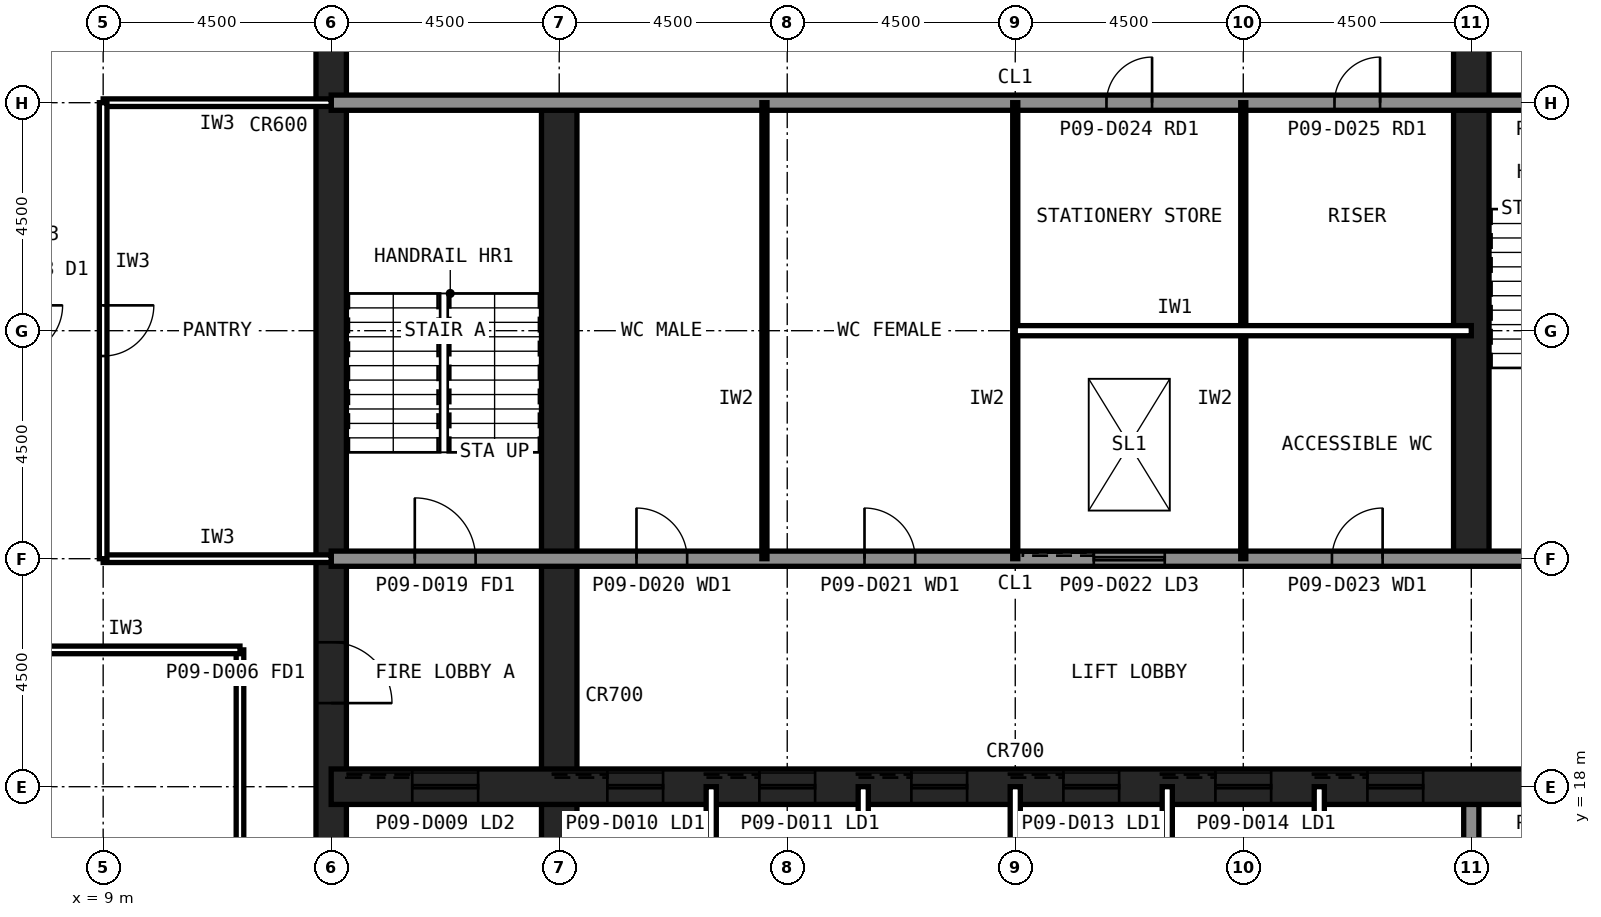
"""IFC4 building model, lengths in metres.
Left out: names, types, materials, properties, quantities, classifications, styles, units other than length and angle.
Written with IfcOpenShell. Run it as: python <this file> out.ifc"""

import sys

from ifc_helpers import new_model, si_unit, direction, frame, frame_2d, origin, place, context, subcontext, project, spatial, rectangle, extrude, element, fill, save


model = new_model("IFC4")
c1 = context("Model", 3, precision=1e-05, world=origin(), true_north=direction((0.0, 1.0)))
c2 = subcontext(c1, "Body", "Model", "MODEL_VIEW")
j1 = project(units=[si_unit("LENGTHUNIT", "METRE"), si_unit("PLANEANGLEUNIT", "RADIAN")], contexts=[c1])
p1 = place(None, origin())
s1 = spatial("IfcSite", under=j1, at=p1, CompositionType="ELEMENT")
p2 = place(p1, origin())
s2 = spatial("IfcBuilding", under=s1, at=p2, CompositionType="ELEMENT")
p3 = place(p2, frame((0.0, 0.0, 41.6)))
s3 = spatial("IfcBuildingStorey", under=s2, at=p3, CompositionType="ELEMENT", Elevation=41.6)
p4 = place(p3, frame((13.5, 40.5, 0.0), z_axis=(0.0, 0.0, 1.0), x_axis=(0.0, -1.0, 0.0)))
e1 = element("IfcWall", 1, at=p4, inside=s3, PredefinedType="SHEAR", context=c2, shape_type="SweptSolid", body=[
    extrude(rectangle(XDim=27.0, YDim=0.6, at=frame_2d((13.5, 0.0))), origin(), (0.0, 0.0, 1.0), 4.2),
])
p5 = place(p4, frame((19.65, 0.0, 0.0)))
e2 = element("IfcOpeningElement", 2, at=p5, cuts=e1, PredefinedType="OPENING", context=c2, shape_type="SweptSolid", body=[
    extrude(rectangle(XDim=1.2, YDim=2.1, at=frame_2d((0.6, 1.05))), frame((0.0, 0.31, 0.0), z_axis=(0.0, -1.0, 0.0), x_axis=(1.0, 0.0, 0.0)), (0.0, 0.0, 1.0), 0.62),
])
p6 = place(p4, frame((5.85, 0.0, 0.0)))
e3 = element("IfcOpeningElement", 3, at=p6, cuts=e1, PredefinedType="OPENING", context=c2, shape_type="SweptSolid", body=[
    extrude(rectangle(XDim=1.8, YDim=2.1, at=frame_2d((0.9, 1.05))), frame((0.0, 0.31, 0.0), z_axis=(0.0, -1.0, 0.0), x_axis=(1.0, 0.0, 0.0)), (0.0, 0.0, 1.0), 0.62),
])
p7 = place(p3, frame((18.0, 13.5, 0.0), z_axis=(0.0, 0.0, 1.0), x_axis=(0.0, 1.0, 0.0)))
e4 = element("IfcWall", 4, at=p7, inside=s3, PredefinedType="SHEAR", context=c2, shape_type="SweptSolid", body=[
    extrude(rectangle(XDim=18.0, YDim=0.7, at=frame_2d((9.0, 0.0))), origin(), (0.0, 0.0, 1.0), 4.2),
])
p8 = place(p3, frame((36.0, 13.5, 0.0), z_axis=(0.0, 0.0, 1.0), x_axis=(0.0, 1.0, 0.0)))
e5 = element("IfcWall", 5, at=p8, inside=s3, PredefinedType="SOLIDWALL", context=c2, shape_type="SweptSolid", body=[
    extrude(rectangle(XDim=4.5, YDim=0.3, at=frame_2d((2.25, 0.0))), origin(), (0.0, 0.0, 1.0), 4.04),
])
p9 = place(p3, frame((36.0, 22.5, 0.0), z_axis=(0.0, 0.0, 1.0), x_axis=(0.0, 1.0, 0.0)))
e6 = element("IfcWall", 6, at=p9, inside=s3, PredefinedType="SHEAR", context=c2, shape_type="SweptSolid", body=[
    extrude(rectangle(XDim=18.0, YDim=0.7, at=frame_2d((9.0, 0.0))), origin(), (0.0, 0.0, 1.0), 4.2),
])
p10 = place(p3, frame((13.5, 18.0, 0.0), z_axis=(0.0, 0.0, 1.0), x_axis=(1.0, 0.0, 0.0)))
e7 = element("IfcWall", 7, at=p10, inside=s3, PredefinedType="SHEAR", context=c2, shape_type="SweptSolid", body=[
    extrude(rectangle(XDim=27.0, YDim=0.7, at=frame_2d((13.5, 0.0))), origin(), (0.0, 0.0, 1.0), 4.2),
])
p11 = place(p10, frame((24.3, 0.0, 0.0)))
e8 = element("IfcOpeningElement", 8, at=p11, cuts=e7, PredefinedType="OPENING", context=c2, shape_type="SweptSolid", body=[
    extrude(rectangle(XDim=0.9, YDim=2.1, at=frame_2d((0.45, 1.05))), frame((0.0, 0.36, 0.0), z_axis=(0.0, -1.0, 0.0), x_axis=(1.0, 0.0, 0.0)), (0.0, 0.0, 1.0), 0.72),
])
p12 = place(p10, frame((5.45, 0.0, 0.0)))
e9 = element("IfcOpeningElement", 9, at=p12, cuts=e7, PredefinedType="OPENING", context=c2, shape_type="SweptSolid", body=[
    extrude(rectangle(XDim=1.1, YDim=2.1, at=frame_2d((0.55, 1.05))), frame((0.0, 0.36, 0.0), z_axis=(0.0, -1.0, 0.0), x_axis=(1.0, 0.0, 0.0)), (0.0, 0.0, 1.0), 0.72),
])
p13 = place(p10, frame((8.45, 0.0, 0.0)))
e10 = element("IfcOpeningElement", 10, at=p13, cuts=e7, PredefinedType="OPENING", context=c2, shape_type="SweptSolid", body=[
    extrude(rectangle(XDim=1.1, YDim=2.1, at=frame_2d((0.55, 1.05))), frame((0.0, 0.36, 0.0), z_axis=(0.0, -1.0, 0.0), x_axis=(1.0, 0.0, 0.0)), (0.0, 0.0, 1.0), 0.72),
])
p14 = place(p10, frame((11.45, 0.0, 0.0)))
e11 = element("IfcOpeningElement", 11, at=p14, cuts=e7, PredefinedType="OPENING", context=c2, shape_type="SweptSolid", body=[
    extrude(rectangle(XDim=1.1, YDim=2.1, at=frame_2d((0.55, 1.05))), frame((0.0, 0.36, 0.0), z_axis=(0.0, -1.0, 0.0), x_axis=(1.0, 0.0, 0.0)), (0.0, 0.0, 1.0), 0.72),
])
p15 = place(p10, frame((14.45, 0.0, 0.0)))
e12 = element("IfcOpeningElement", 12, at=p15, cuts=e7, PredefinedType="OPENING", context=c2, shape_type="SweptSolid", body=[
    extrude(rectangle(XDim=1.1, YDim=2.1, at=frame_2d((0.55, 1.05))), frame((0.0, 0.36, 0.0), z_axis=(0.0, -1.0, 0.0), x_axis=(1.0, 0.0, 0.0)), (0.0, 0.0, 1.0), 0.72),
])
p16 = place(p10, frame((17.45, 0.0, 0.0)))
e13 = element("IfcOpeningElement", 13, at=p16, cuts=e7, PredefinedType="OPENING", context=c2, shape_type="SweptSolid", body=[
    extrude(rectangle(XDim=1.1, YDim=2.1, at=frame_2d((0.55, 1.05))), frame((0.0, 0.36, 0.0), z_axis=(0.0, -1.0, 0.0), x_axis=(1.0, 0.0, 0.0)), (0.0, 0.0, 1.0), 0.72),
])
p17 = place(p10, frame((20.45, 0.0, 0.0)))
e14 = element("IfcOpeningElement", 14, at=p17, cuts=e7, PredefinedType="OPENING", context=c2, shape_type="SweptSolid", body=[
    extrude(rectangle(XDim=1.1, YDim=2.1, at=frame_2d((0.55, 1.05))), frame((0.0, 0.36, 0.0), z_axis=(0.0, -1.0, 0.0), x_axis=(1.0, 0.0, 0.0)), (0.0, 0.0, 1.0), 0.72),
])
p18 = place(p10, frame((1.6, 0.0, 0.0)))
e15 = element("IfcOpeningElement", 15, at=p18, cuts=e7, PredefinedType="OPENING", context=c2, shape_type="SweptSolid", body=[
    extrude(rectangle(XDim=1.3, YDim=2.2, at=frame_2d((0.65, 1.1))), frame((0.0, 0.36, 0.0), z_axis=(0.0, -1.0, 0.0), x_axis=(1.0, 0.0, 0.0)), (0.0, 0.0, 1.0), 0.72),
])
p19 = place(p3, frame((13.5, 22.5, 0.0), z_axis=(0.0, 0.0, 1.0), x_axis=(1.0, 0.0, 0.0)))
e16 = element("IfcWall", 16, at=p19, inside=s3, PredefinedType="SOLIDWALL", context=c2, shape_type="SweptSolid", body=[
    extrude(rectangle(XDim=27.0, YDim=0.3, at=frame_2d((13.5, 0.0))), origin(), (0.0, 0.0, 1.0), 4.04),
])
p20 = place(p19, frame((1.65, 0.0, 0.0)))
e17 = element("IfcOpeningElement", 17, at=p20, cuts=e16, PredefinedType="OPENING", context=c2, shape_type="SweptSolid", body=[
    extrude(rectangle(XDim=1.2, YDim=2.1, at=frame_2d((0.6, 1.05))), frame((0.0, 0.16, 0.0), z_axis=(0.0, -1.0, 0.0), x_axis=(1.0, 0.0, 0.0)), (0.0, 0.0, 1.0), 0.32),
])
p21 = place(p19, frame((6.025, 0.0, 0.0)))
e18 = element("IfcOpeningElement", 18, at=p21, cuts=e16, PredefinedType="OPENING", context=c2, shape_type="SweptSolid", body=[
    extrude(rectangle(XDim=1.0, YDim=2.1, at=frame_2d((0.5, 1.05))), frame((0.0, 0.16, 0.0), z_axis=(0.0, -1.0, 0.0), x_axis=(1.0, 0.0, 0.0)), (0.0, 0.0, 1.0), 0.32),
])
p22 = place(p19, frame((10.525, 0.0, 0.0)))
e19 = element("IfcOpeningElement", 19, at=p22, cuts=e16, PredefinedType="OPENING", context=c2, shape_type="SweptSolid", body=[
    extrude(rectangle(XDim=1.0, YDim=2.1, at=frame_2d((0.5, 1.05))), frame((0.0, 0.16, 0.0), z_axis=(0.0, -1.0, 0.0), x_axis=(1.0, 0.0, 0.0)), (0.0, 0.0, 1.0), 0.32),
])
p23 = place(p19, frame((19.75, 0.0, 0.0)))
e20 = element("IfcOpeningElement", 20, at=p23, cuts=e16, PredefinedType="OPENING", context=c2, shape_type="SweptSolid", body=[
    extrude(rectangle(XDim=1.0, YDim=2.1, at=frame_2d((0.5, 1.05))), frame((0.0, 0.16, 0.0), z_axis=(0.0, -1.0, 0.0), x_axis=(1.0, 0.0, 0.0)), (0.0, 0.0, 1.0), 0.32),
])
p24 = place(p19, frame((15.05, 0.0, 0.0)))
e21 = element("IfcOpeningElement", 21, at=p24, cuts=e16, PredefinedType="OPENING", context=c2, shape_type="SweptSolid", body=[
    extrude(rectangle(XDim=1.4, YDim=2.4, at=frame_2d((0.7, 1.2))), frame((0.0, 0.16, 0.0), z_axis=(0.0, -1.0, 0.0), x_axis=(1.0, 0.0, 0.0)), (0.0, 0.0, 1.0), 0.32),
])
p25 = place(p3, frame((13.5, 31.5, 0.0), z_axis=(0.0, 0.0, 1.0), x_axis=(1.0, 0.0, 0.0)))
e22 = element("IfcWall", 22, at=p25, inside=s3, PredefinedType="SOLIDWALL", context=c2, shape_type="SweptSolid", body=[
    extrude(rectangle(XDim=27.0, YDim=0.3, at=frame_2d((13.5, 0.0))), origin(), (0.0, 0.0, 1.0), 4.04),
])
p26 = place(p25, frame((24.15, 0.0, 0.0)))
e23 = element("IfcOpeningElement", 23, at=p26, cuts=e22, PredefinedType="OPENING", context=c2, shape_type="SweptSolid", body=[
    extrude(rectangle(XDim=1.2, YDim=2.1, at=frame_2d((0.6, 1.05))), frame((0.0, 0.16, 0.0), z_axis=(0.0, -1.0, 0.0), x_axis=(1.0, 0.0, 0.0)), (0.0, 0.0, 1.0), 0.32),
])
p27 = place(p25, frame((15.3, 0.0, 0.0)))
e24 = element("IfcOpeningElement", 24, at=p27, cuts=e22, PredefinedType="OPENING", context=c2, shape_type="SweptSolid", body=[
    extrude(rectangle(XDim=0.9, YDim=2.1, at=frame_2d((0.45, 1.05))), frame((0.0, 0.16, 0.0), z_axis=(0.0, -1.0, 0.0), x_axis=(1.0, 0.0, 0.0)), (0.0, 0.0, 1.0), 0.32),
])
p28 = place(p25, frame((19.8, 0.0, 0.0)))
e25 = element("IfcOpeningElement", 25, at=p28, cuts=e22, PredefinedType="OPENING", context=c2, shape_type="SweptSolid", body=[
    extrude(rectangle(XDim=0.9, YDim=2.1, at=frame_2d((0.45, 1.05))), frame((0.0, 0.16, 0.0), z_axis=(0.0, -1.0, 0.0), x_axis=(1.0, 0.0, 0.0)), (0.0, 0.0, 1.0), 0.32),
])
for number, where, z_axis, x_axis in (
    (26, (21.0, 13.5, 0.0), (0.0, 0.0, 1.0), (0.0, 1.0, 0.0)),
    (27, (24.0, 13.5, 0.0), (0.0, 0.0, 1.0), (0.0, 1.0, 0.0)),
    (28, (27.0, 13.5, 0.0), (0.0, 0.0, 1.0), (0.0, 1.0, 0.0)),
    (29, (30.0, 13.5, 0.0), (0.0, 0.0, 1.0), (0.0, 1.0, 0.0)),
    (30, (33.0, 13.5, 0.0), (0.0, 0.0, 1.0), (0.0, 1.0, 0.0)),
):
    element("IfcWall", number, at=place(p3, frame(where, z_axis=z_axis, x_axis=x_axis)), inside=s3, PredefinedType="PARTITIONING", context=c2, shape_type="SweptSolid", body=[
        extrude(rectangle(XDim=4.5, YDim=0.2, at=frame_2d((2.25, 0.0))), origin(), (0.0, 0.0, 1.0), 4.04),
    ])
for number, where, z_axis, x_axis in (
    (31, (22.05, 22.5, 0.0), (0.0, 0.0, 1.0), (0.0, 1.0, 0.0)),
    (32, (27.0, 22.5, 0.0), (0.0, 0.0, 1.0), (0.0, 1.0, 0.0)),
    (33, (31.5, 22.5, 0.0), (0.0, 0.0, 1.0), (0.0, 1.0, 0.0)),
):
    element("IfcWall", number, at=place(p3, frame(where, z_axis=z_axis, x_axis=x_axis)), inside=s3, PredefinedType="PLUMBINGWALL", context=c2, shape_type="SweptSolid", body=[
        extrude(rectangle(XDim=9.0, YDim=0.1, at=frame_2d((4.5, 0.0))), origin(), (0.0, 0.0, 1.0), 4.04),
    ])
p29 = place(p3, frame((27.0, 27.0, 0.0), z_axis=(0.0, 0.0, 1.0), x_axis=(1.0, 0.0, 0.0)))
e34 = element("IfcWall", 34, at=p29, inside=s3, PredefinedType="PARTITIONING", context=c2, shape_type="SweptSolid", body=[
    extrude(rectangle(XDim=9.0, YDim=0.2, at=frame_2d((4.5, 0.0))), origin(), (0.0, 0.0, 1.0), 4.04),
])
p30 = place(p3, frame((11.7, 20.7, 0.0), z_axis=(0.0, 0.0, 1.0), x_axis=(0.0, -1.0, 0.0)))
e35 = element("IfcWall", 35, at=p30, inside=s3, PredefinedType="PARTITIONING", context=c2, shape_type="SweptSolid", body=[
    extrude(rectangle(XDim=9.0, YDim=0.15, at=frame_2d((4.5, 0.0))), origin(), (0.0, 0.0, 1.0), 4.04),
])
p31 = place(p3, frame((7.2, 20.7, 0.0), z_axis=(0.0, 0.0, 1.0), x_axis=(1.0, 0.0, 0.0)))
e36 = element("IfcWall", 36, at=p31, inside=s3, PredefinedType="PARTITIONING", context=c2, shape_type="SweptSolid", body=[
    extrude(rectangle(XDim=4.5, YDim=0.15, at=frame_2d((2.25, 0.0))), origin(), (0.0, 0.0, 1.0), 4.04),
])
for number, where, z_axis, x_axis in (
    (37, (9.0, 22.5, 0.0), (0.0, 0.0, 1.0), (1.0, 0.0, 0.0)),
    (38, (13.5, 31.5, 0.0), (0.0, 0.0, 1.0), (-1.0, 0.0, 0.0)),
):
    element("IfcWall", number, at=place(p3, frame(where, z_axis=z_axis, x_axis=x_axis)), inside=s3, PredefinedType="PARTITIONING", context=c2, shape_type="SweptSolid", body=[
        extrude(rectangle(XDim=4.5, YDim=0.15, at=frame_2d((2.25, 0.0))), origin(), (0.0, 0.0, 1.0), 3.189),
    ])
p32 = place(p3, frame((9.0, 31.5, 0.0), z_axis=(0.0, 0.0, 1.0), x_axis=(0.0, -1.0, 0.0)))
e39 = element("IfcWall", 39, at=p32, inside=s3, PredefinedType="PARTITIONING", context=c2, shape_type="SweptSolid", body=[
    extrude(rectangle(XDim=9.0, YDim=0.15, at=frame_2d((4.5, 0.0))), origin(), (0.0, 0.0, 1.0), 4.04),
])
p33 = place(p32, frame((4.0, 0.0, 0.0)))
e40 = element("IfcOpeningElement", 40, at=p33, cuts=e39, PredefinedType="OPENING", context=c2, shape_type="SweptSolid", body=[
    extrude(rectangle(XDim=1.0, YDim=2.1, at=frame_2d((0.5, 1.05))), frame((0.0, 0.085, 0.0), z_axis=(0.0, -1.0, 0.0), x_axis=(1.0, 0.0, 0.0)), (0.0, 0.0, 1.0), 0.17),
])
p34 = place(p5, origin())
e41 = element("IfcDoor", 41, at=p34, inside=s3, OperationType="SINGLE_SWING_RIGHT", PredefinedType="DOOR", context=c2, shape_type="SweptSolid", body=[
    extrude(rectangle(XDim=1.2, YDim=2.1, at=frame_2d((0.6, 1.05))), frame((0.0, 0.025, 0.0), z_axis=(0.0, -1.0, 0.0), x_axis=(1.0, 0.0, 0.0)), (0.0, 0.0, 1.0), 0.05),
])
fill(e2, e41)
p35 = place(p20, origin())
e42 = element("IfcDoor", 42, at=p35, inside=s3, OperationType="SINGLE_SWING_LEFT", PredefinedType="DOOR", context=c2, shape_type="SweptSolid", body=[
    extrude(rectangle(XDim=1.2, YDim=2.1, at=frame_2d((0.6, 1.05))), frame((0.0, 0.025, 0.0), z_axis=(0.0, -1.0, 0.0), x_axis=(1.0, 0.0, 0.0)), (0.0, 0.0, 1.0), 0.05),
])
fill(e17, e42)
p36 = place(p21, origin())
e43 = element("IfcDoor", 43, at=p36, inside=s3, OperationType="SINGLE_SWING_LEFT", PredefinedType="DOOR", context=c2, shape_type="SweptSolid", body=[
    extrude(rectangle(XDim=1.0, YDim=2.1, at=frame_2d((0.5, 1.05))), frame((0.0, 0.025, 0.0), z_axis=(0.0, -1.0, 0.0), x_axis=(1.0, 0.0, 0.0)), (0.0, 0.0, 1.0), 0.05),
])
fill(e18, e43)
p37 = place(p22, origin())
e44 = element("IfcDoor", 44, at=p37, inside=s3, OperationType="SINGLE_SWING_LEFT", PredefinedType="DOOR", context=c2, shape_type="SweptSolid", body=[
    extrude(rectangle(XDim=1.0, YDim=2.1, at=frame_2d((0.5, 1.05))), frame((0.0, 0.025, 0.0), z_axis=(0.0, -1.0, 0.0), x_axis=(1.0, 0.0, 0.0)), (0.0, 0.0, 1.0), 0.05),
])
fill(e19, e44)
p38 = place(p23, origin())
e45 = element("IfcDoor", 45, at=p38, inside=s3, OperationType="SINGLE_SWING_RIGHT", PredefinedType="DOOR", context=c2, shape_type="SweptSolid", body=[
    extrude(rectangle(XDim=1.0, YDim=2.1, at=frame_2d((0.5, 1.05))), frame((0.0, 0.025, 0.0), z_axis=(0.0, -1.0, 0.0), x_axis=(1.0, 0.0, 0.0)), (0.0, 0.0, 1.0), 0.05),
])
fill(e20, e45)
p39 = place(p27, origin())
e46 = element("IfcDoor", 46, at=p39, inside=s3, OperationType="SINGLE_SWING_RIGHT", PredefinedType="DOOR", context=c2, shape_type="SweptSolid", body=[
    extrude(rectangle(XDim=0.9, YDim=2.1, at=frame_2d((0.45, 1.05))), frame((0.0, 0.025, 0.0), z_axis=(0.0, -1.0, 0.0), x_axis=(1.0, 0.0, 0.0)), (0.0, 0.0, 1.0), 0.05),
])
fill(e24, e46)
p40 = place(p28, origin())
e47 = element("IfcDoor", 47, at=p40, inside=s3, OperationType="SINGLE_SWING_RIGHT", PredefinedType="DOOR", context=c2, shape_type="SweptSolid", body=[
    extrude(rectangle(XDim=0.9, YDim=2.1, at=frame_2d((0.45, 1.05))), frame((0.0, 0.025, 0.0), z_axis=(0.0, -1.0, 0.0), x_axis=(1.0, 0.0, 0.0)), (0.0, 0.0, 1.0), 0.05),
])
fill(e25, e47)
p41 = place(p12, origin())
e48 = element("IfcDoor", 48, at=p41, inside=s3, OperationType="SLIDING_TO_LEFT", PredefinedType="DOOR", context=c2, shape_type="SweptSolid", body=[
    extrude(rectangle(XDim=1.1, YDim=2.1, at=frame_2d((0.55, 1.05))), frame((0.0, 0.025, 0.0), z_axis=(0.0, -1.0, 0.0), x_axis=(1.0, 0.0, 0.0)), (0.0, 0.0, 1.0), 0.05),
])
fill(e9, e48)
p42 = place(p13, origin())
e49 = element("IfcDoor", 49, at=p42, inside=s3, OperationType="SLIDING_TO_LEFT", PredefinedType="DOOR", context=c2, shape_type="SweptSolid", body=[
    extrude(rectangle(XDim=1.1, YDim=2.1, at=frame_2d((0.55, 1.05))), frame((0.0, 0.025, 0.0), z_axis=(0.0, -1.0, 0.0), x_axis=(1.0, 0.0, 0.0)), (0.0, 0.0, 1.0), 0.05),
])
fill(e10, e49)
p43 = place(p14, origin())
e50 = element("IfcDoor", 50, at=p43, inside=s3, OperationType="SLIDING_TO_LEFT", PredefinedType="DOOR", context=c2, shape_type="SweptSolid", body=[
    extrude(rectangle(XDim=1.1, YDim=2.1, at=frame_2d((0.55, 1.05))), frame((0.0, 0.025, 0.0), z_axis=(0.0, -1.0, 0.0), x_axis=(1.0, 0.0, 0.0)), (0.0, 0.0, 1.0), 0.05),
])
fill(e11, e50)
p44 = place(p15, origin())
e51 = element("IfcDoor", 51, at=p44, inside=s3, OperationType="SLIDING_TO_LEFT", PredefinedType="DOOR", context=c2, shape_type="SweptSolid", body=[
    extrude(rectangle(XDim=1.1, YDim=2.1, at=frame_2d((0.55, 1.05))), frame((0.0, 0.025, 0.0), z_axis=(0.0, -1.0, 0.0), x_axis=(1.0, 0.0, 0.0)), (0.0, 0.0, 1.0), 0.05),
])
fill(e12, e51)
p45 = place(p16, origin())
e52 = element("IfcDoor", 52, at=p45, inside=s3, OperationType="SLIDING_TO_LEFT", PredefinedType="DOOR", context=c2, shape_type="SweptSolid", body=[
    extrude(rectangle(XDim=1.1, YDim=2.1, at=frame_2d((0.55, 1.05))), frame((0.0, 0.025, 0.0), z_axis=(0.0, -1.0, 0.0), x_axis=(1.0, 0.0, 0.0)), (0.0, 0.0, 1.0), 0.05),
])
fill(e13, e52)
p46 = place(p17, origin())
e53 = element("IfcDoor", 53, at=p46, inside=s3, OperationType="SLIDING_TO_LEFT", PredefinedType="DOOR", context=c2, shape_type="SweptSolid", body=[
    extrude(rectangle(XDim=1.1, YDim=2.1, at=frame_2d((0.55, 1.05))), frame((0.0, 0.025, 0.0), z_axis=(0.0, -1.0, 0.0), x_axis=(1.0, 0.0, 0.0)), (0.0, 0.0, 1.0), 0.05),
])
fill(e14, e53)
p47 = place(p18, origin())
e54 = element("IfcDoor", 54, at=p47, inside=s3, OperationType="SLIDING_TO_LEFT", PredefinedType="DOOR", context=c2, shape_type="SweptSolid", body=[
    extrude(rectangle(XDim=1.3, YDim=2.2, at=frame_2d((0.65, 1.1))), frame((0.0, 0.025, 0.0), z_axis=(0.0, -1.0, 0.0), x_axis=(1.0, 0.0, 0.0)), (0.0, 0.0, 1.0), 0.05),
])
fill(e15, e54)
p48 = place(p24, origin())
e55 = element("IfcDoor", 55, at=p48, inside=s3, OperationType="SLIDING_TO_LEFT", PredefinedType="DOOR", context=c2, shape_type="SweptSolid", body=[
    extrude(rectangle(XDim=1.4, YDim=2.4, at=frame_2d((0.7, 1.2))), frame((0.0, 0.025, 0.0), z_axis=(0.0, -1.0, 0.0), x_axis=(1.0, 0.0, 0.0)), (0.0, 0.0, 1.0), 0.05),
])
fill(e21, e55)
p49 = place(p33, origin())
e56 = element("IfcDoor", 56, at=p49, inside=s3, OperationType="SINGLE_SWING_LEFT", PredefinedType="DOOR", context=c2, shape_type="SweptSolid", body=[
    extrude(rectangle(XDim=1.0, YDim=2.1, at=frame_2d((0.5, 1.05))), frame((0.0, 0.025, 0.0), z_axis=(0.0, -1.0, 0.0), x_axis=(1.0, 0.0, 0.0)), (0.0, 0.0, 1.0), 0.05),
])
fill(e40, e56)
save(model, sys.argv[1])
